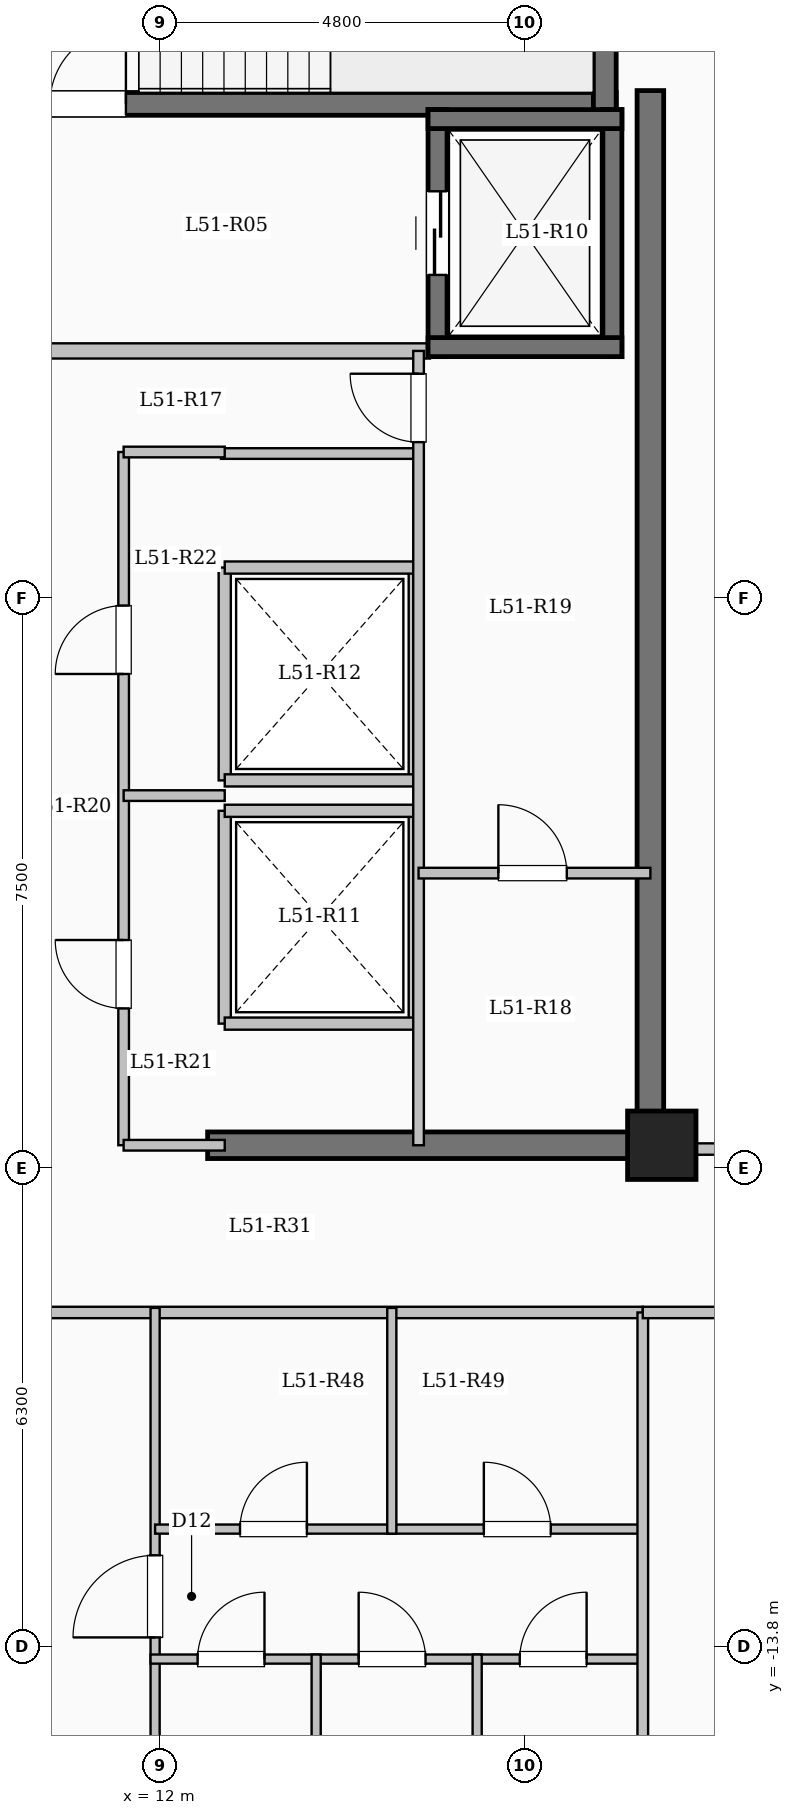
"""IFC4 building model, lengths in metres.
Left out: names, types, materials, properties, quantities, classifications, styles, units other than length and angle.
Written with IfcOpenShell. Run it as: python <this file> out.ifc"""

import sys

from ifc_helpers import new_model, si_unit, direction, frame, frame_2d, origin, origin_2d, place, context, subcontext, project, spatial, rectangle, extrude, element, fill, save


model = new_model("IFC4")
c1 = context("Model", 3, precision=1e-05, world=origin(), true_north=direction((0.0, 1.0)))
c2 = subcontext(c1, "Body", "Model", "MODEL_VIEW")
j1 = project(units=[si_unit("LENGTHUNIT", "METRE"), si_unit("PLANEANGLEUNIT", "RADIAN")], contexts=[c1])
p1 = place(None, origin())
s1 = spatial("IfcSite", under=j1, at=p1, CompositionType="ELEMENT")
p2 = place(p1, origin())
s2 = spatial("IfcBuilding", under=s1, at=p2, CompositionType="ELEMENT")
p3 = place(p2, frame((0.0, 0.0, 190.25)))
s3 = spatial("IfcBuildingStorey", under=s2, at=p3, CompositionType="ELEMENT", Elevation=190.25)
p4 = place(p3, frame((18.6, -7.2, 0.0), z_axis=(0.0, 0.0, 1.0), x_axis=(1.0, 0.0, 0.0)))
e1 = element("IfcColumn", 1, at=p4, inside=s3, PredefinedType="COLUMN", context=c2, shape_type="SweptSolid", body=[
    extrude(rectangle(XDim=0.9, YDim=0.9, at=origin_2d()), origin(), (0.0, 0.0, 1.0), 3.35),
])
p5 = place(p3, frame((10.0, 6.5, 0.0), z_axis=(0.0, 0.0, 1.0), x_axis=(1.0, 0.0, 0.0)))
e2 = element("IfcWall", 2, at=p5, inside=s3, PredefinedType="SHEAR", context=c2, shape_type="SweptSolid", body=[
    extrude(rectangle(XDim=8.0, YDim=0.3, at=frame_2d((4.0, 0.0))), origin(), (0.0, 0.0, 1.0), 3.35),
])
p6 = place(p5, frame((0.55, 0.0, 0.0)))
e3 = element("IfcOpeningElement", 3, at=p6, cuts=e2, PredefinedType="OPENING", context=c2, shape_type="SweptSolid", body=[
    extrude(rectangle(XDim=1.0, YDim=2.15, at=frame_2d((0.5, 1.075))), frame((0.0, 0.16, 0.0), z_axis=(0.0, -1.0, 0.0), x_axis=(1.0, 0.0, 0.0)), (0.0, 0.0, 1.0), 0.32),
])
p7 = place(p3, frame((17.85, 6.35, 0.0), z_axis=(0.0, 0.0, 1.0), x_axis=(0.0, 1.0, 0.0)))
e4 = element("IfcWall", 4, at=p7, inside=s3, PredefinedType="SHEAR", context=c2, shape_type="SweptSolid", body=[
    extrude(rectangle(XDim=3.59, YDim=0.3, at=frame_2d((1.795, 0.0))), origin(), (0.0, 0.0, 1.0), 3.35),
])
p8 = place(p3, frame((10.15, 3.25, 0.0), z_axis=(0.0, 0.0, 1.0), x_axis=(1.0, 0.0, 0.0)))
e5 = element("IfcWall", 5, at=p8, inside=s3, PredefinedType="SOLIDWALL", context=c2, shape_type="SweptSolid", body=[
    extrude(rectangle(XDim=5.4, YDim=0.2, at=frame_2d((2.7, 0.0))), origin(), (0.0, 0.0, 1.0), 3.1),
])
p9 = place(p3, frame((15.65, 3.175, 0.0), z_axis=(0.0, 0.0, 1.0), x_axis=(0.0, 1.0, 0.0)))
e6 = element("IfcWall", 6, at=p9, inside=s3, PredefinedType="SHEAR", context=c2, shape_type="SweptSolid", body=[
    extrude(rectangle(XDim=3.25, YDim=0.25, at=frame_2d((1.625, 0.0))), origin(), (0.0, 0.0, 1.0), 3.35),
])
p10 = place(p9, frame((1.075, 0.0, 0.0)))
e7 = element("IfcOpeningElement", 7, at=p10, cuts=e6, PredefinedType="OPENING", context=c2, shape_type="SweptSolid", body=[
    extrude(rectangle(XDim=1.1, YDim=2.15, at=frame_2d((0.55, 1.075))), frame((0.0, 0.135, 0.0), z_axis=(0.0, -1.0, 0.0), x_axis=(1.0, 0.0, 0.0)), (0.0, 0.0, 1.0), 0.27),
])
p11 = place(p3, frame((17.95, 3.175, 0.0), z_axis=(0.0, 0.0, 1.0), x_axis=(0.0, 1.0, 0.0)))
e8 = element("IfcWall", 8, at=p11, inside=s3, PredefinedType="SHEAR", context=c2, shape_type="SweptSolid", body=[
    extrude(rectangle(XDim=3.25, YDim=0.25, at=frame_2d((1.625, 0.0))), origin(), (0.0, 0.0, 1.0), 3.35),
])
for number, where, z_axis, x_axis in (
    (9, (15.525, 3.3, 0.0), (0.0, 0.0, 1.0), (1.0, 0.0, 0.0)),
    (10, (15.525, 6.3, 0.0), (0.0, 0.0, 1.0), (1.0, 0.0, 0.0)),
):
    element("IfcWall", number, at=place(p3, frame(where, z_axis=z_axis, x_axis=x_axis)), inside=s3, PredefinedType="SHEAR", context=c2, shape_type="SweptSolid", body=[
        extrude(rectangle(XDim=2.55, YDim=0.25, at=frame_2d((1.275, 0.0))), origin(), (0.0, 0.0, 1.0), 3.35),
    ])
for number, where, z_axis, x_axis in (
    (11, (12.85, -5.6, 0.0), (0.0, 0.0, 1.0), (0.0, 1.0, 0.0)),
    (12, (15.35, -5.6, 0.0), (0.0, 0.0, 1.0), (0.0, 1.0, 0.0)),
):
    element("IfcWall", number, at=place(p3, frame(where, z_axis=z_axis, x_axis=x_axis)), inside=s3, PredefinedType="SOLIDWALL", context=c2, shape_type="SweptSolid", body=[
        extrude(rectangle(XDim=2.8, YDim=0.16, at=frame_2d((1.4, 0.0))), origin(), (0.0, 0.0, 1.0), 3.1),
    ])
for number, where, z_axis, x_axis in (
    (13, (12.85, -5.6, 0.0), (0.0, 0.0, 1.0), (1.0, 0.0, 0.0)),
    (14, (12.85, -2.8, 0.0), (0.0, 0.0, 1.0), (1.0, 0.0, 0.0)),
):
    element("IfcWall", number, at=place(p3, frame(where, z_axis=z_axis, x_axis=x_axis)), inside=s3, PredefinedType="SOLIDWALL", context=c2, shape_type="SweptSolid", body=[
        extrude(rectangle(XDim=2.5, YDim=0.16, at=frame_2d((1.25, 0.0))), origin(), (0.0, 0.0, 1.0), 3.1),
    ])
for number, where, z_axis, x_axis in (
    (15, (12.85, -2.4, 0.0), (0.0, 0.0, 1.0), (0.0, 1.0, 0.0)),
    (16, (15.35, -2.4, 0.0), (0.0, 0.0, 1.0), (0.0, 1.0, 0.0)),
):
    element("IfcWall", number, at=place(p3, frame(where, z_axis=z_axis, x_axis=x_axis)), inside=s3, PredefinedType="SOLIDWALL", context=c2, shape_type="SweptSolid", body=[
        extrude(rectangle(XDim=2.8, YDim=0.16, at=frame_2d((1.4, 0.0))), origin(), (0.0, 0.0, 1.0), 3.1),
    ])
for number, where, z_axis, x_axis in (
    (17, (12.85, -2.4, 0.0), (0.0, 0.0, 1.0), (1.0, 0.0, 0.0)),
    (18, (12.85, 0.4, 0.0), (0.0, 0.0, 1.0), (1.0, 0.0, 0.0)),
):
    element("IfcWall", number, at=place(p3, frame(where, z_axis=z_axis, x_axis=x_axis)), inside=s3, PredefinedType="SOLIDWALL", context=c2, shape_type="SweptSolid", body=[
        extrude(rectangle(XDim=2.5, YDim=0.16, at=frame_2d((1.25, 0.0))), origin(), (0.0, 0.0, 1.0), 3.1),
    ])
p12 = place(p3, frame((18.45, -7.375, 0.0), z_axis=(0.0, 0.0, 1.0), x_axis=(0.0, 1.0, 0.0)))
e19 = element("IfcWall", 19, at=p12, inside=s3, PredefinedType="SHEAR", context=c2, shape_type="SweptSolid", body=[
    extrude(rectangle(XDim=14.05, YDim=0.35, at=frame_2d((7.025, 0.0))), origin(), (0.0, 0.0, 1.0), 3.35),
])
p13 = place(p3, frame((12.625, -7.2, 0.0), z_axis=(0.0, 0.0, 1.0), x_axis=(1.0, 0.0, 0.0)))
e20 = element("IfcWall", 20, at=p13, inside=s3, PredefinedType="SHEAR", context=c2, shape_type="SweptSolid", body=[
    extrude(rectangle(XDim=6.0, YDim=0.35, at=frame_2d((3.0, 0.0))), origin(), (0.0, 0.0, 1.0), 3.35),
])
p14 = place(p3, frame((12.8, 1.9, 0.0), z_axis=(0.0, 0.0, 1.0), x_axis=(1.0, 0.0, 0.0)))
e21 = element("IfcWall", 21, at=p14, inside=s3, PredefinedType="PARTITIONING", context=c2, shape_type="SweptSolid", body=[
    extrude(rectangle(XDim=2.6, YDim=0.14, at=frame_2d((1.3, 0.0))), origin(), (0.0, 0.0, 1.0), 3.1),
])
p15 = place(p3, frame((15.4, -7.2, 0.0), z_axis=(0.0, 0.0, 1.0), x_axis=(0.0, 1.0, 0.0)))
e22 = element("IfcWall", 22, at=p15, inside=s3, PredefinedType="PARTITIONING", context=c2, shape_type="SweptSolid", body=[
    extrude(rectangle(XDim=10.45, YDim=0.14, at=frame_2d((5.225, 0.0))), origin(), (0.0, 0.0, 1.0), 3.1),
])
p16 = place(p15, frame((9.25, 0.0, 0.0)))
e23 = element("IfcOpeningElement", 23, at=p16, cuts=e22, PredefinedType="OPENING", context=c2, shape_type="SweptSolid", body=[
    extrude(rectangle(XDim=0.9, YDim=2.08, at=frame_2d((0.45, 1.04))), frame((0.0, 0.08, 0.0), z_axis=(0.0, -1.0, 0.0), x_axis=(1.0, 0.0, 0.0)), (0.0, 0.0, 1.0), 0.16),
])
p17 = place(p3, frame((15.4, -3.62, 0.0), z_axis=(0.0, 0.0, 1.0), x_axis=(1.0, 0.0, 0.0)))
e24 = element("IfcWall", 24, at=p17, inside=s3, PredefinedType="PARTITIONING", context=c2, shape_type="SweptSolid", body=[
    extrude(rectangle(XDim=3.05, YDim=0.14, at=frame_2d((1.525, 0.0))), origin(), (0.0, 0.0, 1.0), 3.1),
])
p18 = place(p17, frame((1.05, 0.0, 0.0)))
e25 = element("IfcOpeningElement", 25, at=p18, cuts=e24, PredefinedType="OPENING", context=c2, shape_type="SweptSolid", body=[
    extrude(rectangle(XDim=0.9, YDim=2.08, at=frame_2d((0.45, 1.04))), frame((0.0, 0.08, 0.0), z_axis=(0.0, -1.0, 0.0), x_axis=(1.0, 0.0, 0.0)), (0.0, 0.0, 1.0), 0.16),
])
p19 = place(p3, frame((11.52, -7.2, 0.0), z_axis=(0.0, 0.0, 1.0), x_axis=(0.0, 1.0, 0.0)))
e26 = element("IfcWall", 26, at=p19, inside=s3, PredefinedType="PARTITIONING", context=c2, shape_type="SweptSolid", body=[
    extrude(rectangle(XDim=9.12, YDim=0.14, at=frame_2d((4.56, 0.0))), origin(), (0.0, 0.0, 1.0), 3.1),
])
p20 = place(p19, frame((1.8, 0.0, 0.0)))
e27 = element("IfcOpeningElement", 27, at=p20, cuts=e26, PredefinedType="OPENING", context=c2, shape_type="SweptSolid", body=[
    extrude(rectangle(XDim=0.9, YDim=2.08, at=frame_2d((0.45, 1.04))), frame((0.0, 0.08, 0.0), z_axis=(0.0, -1.0, 0.0), x_axis=(1.0, 0.0, 0.0)), (0.0, 0.0, 1.0), 0.16),
])
p21 = place(p19, frame((6.2, 0.0, 0.0)))
e28 = element("IfcOpeningElement", 28, at=p21, cuts=e26, PredefinedType="OPENING", context=c2, shape_type="SweptSolid", body=[
    extrude(rectangle(XDim=0.9, YDim=2.08, at=frame_2d((0.45, 1.04))), frame((0.0, 0.08, 0.0), z_axis=(0.0, -1.0, 0.0), x_axis=(1.0, 0.0, 0.0)), (0.0, 0.0, 1.0), 0.16),
])
p22 = place(p3, frame((11.52, 1.92, 0.0), z_axis=(0.0, 0.0, 1.0), x_axis=(1.0, 0.0, 0.0)))
e29 = element("IfcWall", 29, at=p22, inside=s3, PredefinedType="PARTITIONING", context=c2, shape_type="SweptSolid", body=[
    extrude(rectangle(XDim=1.33, YDim=0.14, at=frame_2d((0.665, 0.0))), origin(), (0.0, 0.0, 1.0), 3.1),
])
p23 = place(p3, frame((11.52, -7.2, 0.0), z_axis=(0.0, 0.0, 1.0), x_axis=(1.0, 0.0, 0.0)))
e30 = element("IfcWall", 30, at=p23, inside=s3, PredefinedType="PARTITIONING", context=c2, shape_type="SweptSolid", body=[
    extrude(rectangle(XDim=1.33, YDim=0.14, at=frame_2d((0.665, 0.0))), origin(), (0.0, 0.0, 1.0), 2.235),
])
p24 = place(p3, frame((11.52, -2.6, 0.0), z_axis=(0.0, 0.0, 1.0), x_axis=(1.0, 0.0, 0.0)))
e31 = element("IfcWall", 31, at=p24, inside=s3, PredefinedType="PARTITIONING", context=c2, shape_type="SweptSolid", body=[
    extrude(rectangle(XDim=1.33, YDim=0.14, at=frame_2d((0.665, 0.0))), origin(), (0.0, 0.0, 1.0), 3.1),
])
p25 = place(p3, frame((8.55, -9.4, 0.0), z_axis=(0.0, 0.0, 1.0), x_axis=(1.0, 0.0, 0.0)))
e32 = element("IfcWall", 32, at=p25, inside=s3, PredefinedType="PARTITIONING", context=c2, shape_type="SweptSolid", body=[
    extrude(rectangle(XDim=9.8, YDim=0.15, at=frame_2d((4.9, 0.0))), origin(), (0.0, 0.0, 1.0), 3.1),
])
p26 = place(p25, frame((0.9, 0.0, 0.0)))
e33 = element("IfcOpeningElement", 33, at=p26, cuts=e32, PredefinedType="OPENING", context=c2, shape_type="SweptSolid", body=[
    extrude(rectangle(XDim=0.96, YDim=2.15, at=frame_2d((0.48, 1.075))), frame((0.0, 0.085, 0.0), z_axis=(0.0, -1.0, 0.0), x_axis=(1.0, 0.0, 0.0)), (0.0, 0.0, 1.0), 0.17),
])
p27 = place(p3, frame((11.934, -20.9, 0.0), z_axis=(0.0, 0.0, 1.0), x_axis=(0.0, 1.0, 0.0)))
e34 = element("IfcWall", 34, at=p27, inside=s3, PredefinedType="PARTITIONING", context=c2, shape_type="SweptSolid", body=[
    extrude(rectangle(XDim=11.56, YDim=0.12, at=frame_2d((5.78, 0.0))), origin(), (0.0, 0.0, 1.0), 3.1),
])
p28 = place(p27, frame((7.225, 0.0, 0.0)))
e35 = element("IfcOpeningElement", 35, at=p28, cuts=e34, PredefinedType="OPENING", context=c2, shape_type="SweptSolid", body=[
    extrude(rectangle(XDim=1.08, YDim=2.15, at=frame_2d((0.54, 1.075))), frame((0.0, 0.07, 0.0), z_axis=(0.0, -1.0, 0.0), x_axis=(1.0, 0.0, 0.0)), (0.0, 0.0, 1.0), 0.14),
])
p29 = place(p3, frame((11.934, -12.25, 0.0), z_axis=(0.0, 0.0, 1.0), x_axis=(1.0, 0.0, 0.0)))
e36 = element("IfcWall", 36, at=p29, inside=s3, PredefinedType="PARTITIONING", context=c2, shape_type="SweptSolid", body=[
    extrude(rectangle(XDim=3.114, YDim=0.12, at=frame_2d((1.557, 0.0))), origin(), (0.0, 0.0, 1.0), 2.725),
])
p30 = place(p29, frame((1.117, 0.0, 0.0)))
e37 = element("IfcOpeningElement", 37, at=p30, cuts=e36, PredefinedType="OPENING", context=c2, shape_type="SweptSolid", body=[
    extrude(rectangle(XDim=0.88, YDim=2.1, at=frame_2d((0.44, 1.05))), frame((0.0, 0.07, 0.0), z_axis=(0.0, -1.0, 0.0), x_axis=(1.0, 0.0, 0.0)), (0.0, 0.0, 1.0), 0.14),
])
p31 = place(p3, frame((15.048, -12.25, 0.0), z_axis=(0.0, 0.0, 1.0), x_axis=(1.0, 0.0, 0.0)))
e38 = element("IfcWall", 38, at=p31, inside=s3, PredefinedType="PARTITIONING", context=c2, shape_type="SweptSolid", body=[
    extrude(rectangle(XDim=3.302, YDim=0.12, at=frame_2d((1.651, 0.0))), origin(), (0.0, 0.0, 1.0), 3.1),
])
p32 = place(p31, frame((1.211, 0.0, 0.0)))
e39 = element("IfcOpeningElement", 39, at=p32, cuts=e38, PredefinedType="OPENING", context=c2, shape_type="SweptSolid", body=[
    extrude(rectangle(XDim=0.88, YDim=2.1, at=frame_2d((0.44, 1.05))), frame((0.0, 0.07, 0.0), z_axis=(0.0, -1.0, 0.0), x_axis=(1.0, 0.0, 0.0)), (0.0, 0.0, 1.0), 0.14),
])
p33 = place(p3, frame((11.874, -13.96, 0.0), z_axis=(0.0, 0.0, 1.0), x_axis=(1.0, 0.0, 0.0)))
e40 = element("IfcWall", 40, at=p33, inside=s3, PredefinedType="PARTITIONING", context=c2, shape_type="SweptSolid", body=[
    extrude(rectangle(XDim=6.536, YDim=0.12, at=frame_2d((3.268, 0.0))), origin(), (0.0, 0.0, 1.0), 2.725),
])
p34 = place(p33, frame((0.619, 0.0, 0.0)))
e41 = element("IfcOpeningElement", 41, at=p34, cuts=e40, PredefinedType="OPENING", context=c2, shape_type="SweptSolid", body=[
    extrude(rectangle(XDim=0.88, YDim=2.1, at=frame_2d((0.44, 1.05))), frame((0.0, 0.07, 0.0), z_axis=(0.0, -1.0, 0.0), x_axis=(1.0, 0.0, 0.0)), (0.0, 0.0, 1.0), 0.14),
])
p35 = place(p33, frame((2.738, 0.0, 0.0)))
e42 = element("IfcOpeningElement", 42, at=p35, cuts=e40, PredefinedType="OPENING", context=c2, shape_type="SweptSolid", body=[
    extrude(rectangle(XDim=0.88, YDim=2.1, at=frame_2d((0.44, 1.05))), frame((0.0, 0.07, 0.0), z_axis=(0.0, -1.0, 0.0), x_axis=(1.0, 0.0, 0.0)), (0.0, 0.0, 1.0), 0.14),
])
p36 = place(p33, frame((4.857, 0.0, 0.0)))
e43 = element("IfcOpeningElement", 43, at=p36, cuts=e40, PredefinedType="OPENING", context=c2, shape_type="SweptSolid", body=[
    extrude(rectangle(XDim=0.88, YDim=2.1, at=frame_2d((0.44, 1.05))), frame((0.0, 0.07, 0.0), z_axis=(0.0, -1.0, 0.0), x_axis=(1.0, 0.0, 0.0)), (0.0, 0.0, 1.0), 0.14),
])
p37 = place(p3, frame((15.048, -12.31, 0.0), z_axis=(0.0, 0.0, 1.0), x_axis=(0.0, 1.0, 0.0)))
e44 = element("IfcWall", 44, at=p37, inside=s3, PredefinedType="PARTITIONING", context=c2, shape_type="SweptSolid", body=[
    extrude(rectangle(XDim=2.97, YDim=0.12, at=frame_2d((1.485, 0.0))), origin(), (0.0, 0.0, 1.0), 2.585),
])
for number, where, z_axis, x_axis in (
    (45, (14.053, -20.9, 0.0), (0.0, 0.0, 1.0), (0.0, 1.0, 0.0)),
    (46, (16.171, -20.9, 0.0), (0.0, 0.0, 1.0), (0.0, 1.0, 0.0)),
):
    element("IfcWall", number, at=place(p3, frame(where, z_axis=z_axis, x_axis=x_axis)), inside=s3, PredefinedType="PARTITIONING", context=c2, shape_type="SweptSolid", body=[
        extrude(rectangle(XDim=7.0, YDim=0.12, at=frame_2d((3.5, 0.0))), origin(), (0.0, 0.0, 1.0), 3.1),
    ])
p38 = place(p3, frame((18.45, -7.25, 0.0), z_axis=(0.0, 0.0, 1.0), x_axis=(1.0, 0.0, 0.0)))
e47 = element("IfcWall", 47, at=p38, inside=s3, PredefinedType="PARTITIONING", context=c2, shape_type="SweptSolid", body=[
    extrude(rectangle(XDim=5.13, YDim=0.15, at=frame_2d((2.565, 0.0))), origin(), (0.0, 0.0, 1.0), 3.1),
])
p39 = place(p38, frame((1.95, 0.0, 0.0)))
e48 = element("IfcOpeningElement", 48, at=p39, cuts=e47, PredefinedType="OPENING", context=c2, shape_type="SweptSolid", body=[
    extrude(rectangle(XDim=1.08, YDim=2.15, at=frame_2d((0.54, 1.075))), frame((0.0, 0.085, 0.0), z_axis=(0.0, -1.0, 0.0), x_axis=(1.0, 0.0, 0.0)), (0.0, 0.0, 1.0), 0.17),
])
p40 = place(p3, frame((18.35, -17.25, 0.0), z_axis=(0.0, 0.0, 1.0), x_axis=(0.0, 1.0, 0.0)))
e49 = element("IfcWall", 49, at=p40, inside=s3, PredefinedType="PARTITIONING", context=c2, shape_type="SweptSolid", body=[
    extrude(rectangle(XDim=7.85, YDim=0.14, at=frame_2d((3.925, 0.0))), origin(), (0.0, 0.0, 1.0), 3.1),
])
p41 = place(p3, frame((18.35, -9.4, 0.0), z_axis=(0.0, 0.0, 1.0), x_axis=(1.0, 0.0, 0.0)))
e50 = element("IfcWall", 50, at=p41, inside=s3, PredefinedType="PARTITIONING", context=c2, shape_type="SweptSolid", body=[
    extrude(rectangle(XDim=5.23, YDim=0.15, at=frame_2d((2.615, 0.0))), origin(), (0.0, 0.0, 1.0), 3.1),
])
p42 = place(p41, frame((2.14, 0.0, 0.0)))
e51 = element("IfcOpeningElement", 51, at=p42, cuts=e50, PredefinedType="OPENING", context=c2, shape_type="SweptSolid", body=[
    extrude(rectangle(XDim=0.95, YDim=2.15, at=frame_2d((0.475, 1.075))), frame((0.0, 0.085, 0.0), z_axis=(0.0, -1.0, 0.0), x_axis=(1.0, 0.0, 0.0)), (0.0, 0.0, 1.0), 0.17),
])
p43 = place(p6, origin())
e52 = element("IfcDoor", 52, at=p43, inside=s3, OperationType="SINGLE_SWING_RIGHT", PredefinedType="DOOR", context=c2, shape_type="SweptSolid", body=[
    extrude(rectangle(XDim=1.0, YDim=2.15, at=frame_2d((0.5, 1.075))), frame((0.0, 0.025, 0.0), z_axis=(0.0, -1.0, 0.0), x_axis=(1.0, 0.0, 0.0)), (0.0, 0.0, 1.0), 0.05),
])
fill(e3, e52)
p44 = place(p10, origin())
e53 = element("IfcDoor", 53, at=p44, inside=s3, OperationType="SLIDING_TO_LEFT", PredefinedType="DOOR", context=c2, shape_type="SweptSolid", body=[
    extrude(rectangle(XDim=1.1, YDim=2.15, at=frame_2d((0.55, 1.075))), frame((0.0, 0.025, 0.0), z_axis=(0.0, -1.0, 0.0), x_axis=(1.0, 0.0, 0.0)), (0.0, 0.0, 1.0), 0.05),
])
fill(e7, e53)
p45 = place(p16, origin())
e54 = element("IfcDoor", 54, at=p45, inside=s3, OperationType="SINGLE_SWING_RIGHT", PredefinedType="DOOR", context=c2, shape_type="SweptSolid", body=[
    extrude(rectangle(XDim=0.9, YDim=2.08, at=frame_2d((0.45, 1.04))), frame((0.0, 0.025, 0.0), z_axis=(0.0, -1.0, 0.0), x_axis=(1.0, 0.0, 0.0)), (0.0, 0.0, 1.0), 0.05),
])
fill(e23, e54)
p46 = place(p18, origin())
e55 = element("IfcDoor", 55, at=p46, inside=s3, OperationType="SINGLE_SWING_LEFT", PredefinedType="DOOR", context=c2, shape_type="SweptSolid", body=[
    extrude(rectangle(XDim=0.9, YDim=2.08, at=frame_2d((0.45, 1.04))), frame((0.0, 0.025, 0.0), z_axis=(0.0, -1.0, 0.0), x_axis=(1.0, 0.0, 0.0)), (0.0, 0.0, 1.0), 0.05),
])
fill(e25, e55)
p47 = place(p20, origin())
e56 = element("IfcDoor", 56, at=p47, inside=s3, OperationType="SINGLE_SWING_RIGHT", PredefinedType="DOOR", context=c2, shape_type="SweptSolid", body=[
    extrude(rectangle(XDim=0.9, YDim=2.08, at=frame_2d((0.45, 1.04))), frame((0.0, 0.025, 0.0), z_axis=(0.0, -1.0, 0.0), x_axis=(1.0, 0.0, 0.0)), (0.0, 0.0, 1.0), 0.05),
])
fill(e27, e56)
p48 = place(p21, origin())
e57 = element("IfcDoor", 57, at=p48, inside=s3, OperationType="SINGLE_SWING_LEFT", PredefinedType="DOOR", context=c2, shape_type="SweptSolid", body=[
    extrude(rectangle(XDim=0.9, YDim=2.08, at=frame_2d((0.45, 1.04))), frame((0.0, 0.025, 0.0), z_axis=(0.0, -1.0, 0.0), x_axis=(1.0, 0.0, 0.0)), (0.0, 0.0, 1.0), 0.05),
])
fill(e28, e57)
p49 = place(p28, origin())
e58 = element("IfcDoor", 58, at=p49, inside=s3, OperationType="SINGLE_SWING_LEFT", PredefinedType="DOOR", context=c2, shape_type="SweptSolid", body=[
    extrude(rectangle(XDim=1.08, YDim=2.15, at=frame_2d((0.54, 1.075))), frame((0.0, 0.025, 0.0), z_axis=(0.0, -1.0, 0.0), x_axis=(1.0, 0.0, 0.0)), (0.0, 0.0, 1.0), 0.05),
])
fill(e35, e58)
p50 = place(p30, origin())
e59 = element("IfcDoor", 59, at=p50, inside=s3, OperationType="SINGLE_SWING_RIGHT", PredefinedType="DOOR", context=c2, shape_type="SweptSolid", body=[
    extrude(rectangle(XDim=0.88, YDim=2.1, at=frame_2d((0.44, 1.05))), frame((0.0, 0.025, 0.0), z_axis=(0.0, -1.0, 0.0), x_axis=(1.0, 0.0, 0.0)), (0.0, 0.0, 1.0), 0.05),
])
fill(e37, e59)
p51 = place(p32, origin())
e60 = element("IfcDoor", 60, at=p51, inside=s3, OperationType="SINGLE_SWING_LEFT", PredefinedType="DOOR", context=c2, shape_type="SweptSolid", body=[
    extrude(rectangle(XDim=0.88, YDim=2.1, at=frame_2d((0.44, 1.05))), frame((0.0, 0.025, 0.0), z_axis=(0.0, -1.0, 0.0), x_axis=(1.0, 0.0, 0.0)), (0.0, 0.0, 1.0), 0.05),
])
fill(e39, e60)
p52 = place(p34, origin())
e61 = element("IfcDoor", 61, at=p52, inside=s3, OperationType="SINGLE_SWING_RIGHT", PredefinedType="DOOR", context=c2, shape_type="SweptSolid", body=[
    extrude(rectangle(XDim=0.88, YDim=2.1, at=frame_2d((0.44, 1.05))), frame((0.0, 0.025, 0.0), z_axis=(0.0, -1.0, 0.0), x_axis=(1.0, 0.0, 0.0)), (0.0, 0.0, 1.0), 0.05),
])
fill(e41, e61)
p53 = place(p35, origin())
e62 = element("IfcDoor", 62, at=p53, inside=s3, OperationType="SINGLE_SWING_LEFT", PredefinedType="DOOR", context=c2, shape_type="SweptSolid", body=[
    extrude(rectangle(XDim=0.88, YDim=2.1, at=frame_2d((0.44, 1.05))), frame((0.0, 0.025, 0.0), z_axis=(0.0, -1.0, 0.0), x_axis=(1.0, 0.0, 0.0)), (0.0, 0.0, 1.0), 0.05),
])
fill(e42, e62)
p54 = place(p36, origin())
e63 = element("IfcDoor", 63, at=p54, inside=s3, OperationType="SINGLE_SWING_RIGHT", PredefinedType="DOOR", context=c2, shape_type="SweptSolid", body=[
    extrude(rectangle(XDim=0.88, YDim=2.1, at=frame_2d((0.44, 1.05))), frame((0.0, 0.025, 0.0), z_axis=(0.0, -1.0, 0.0), x_axis=(1.0, 0.0, 0.0)), (0.0, 0.0, 1.0), 0.05),
])
fill(e43, e63)
save(model, sys.argv[1])
